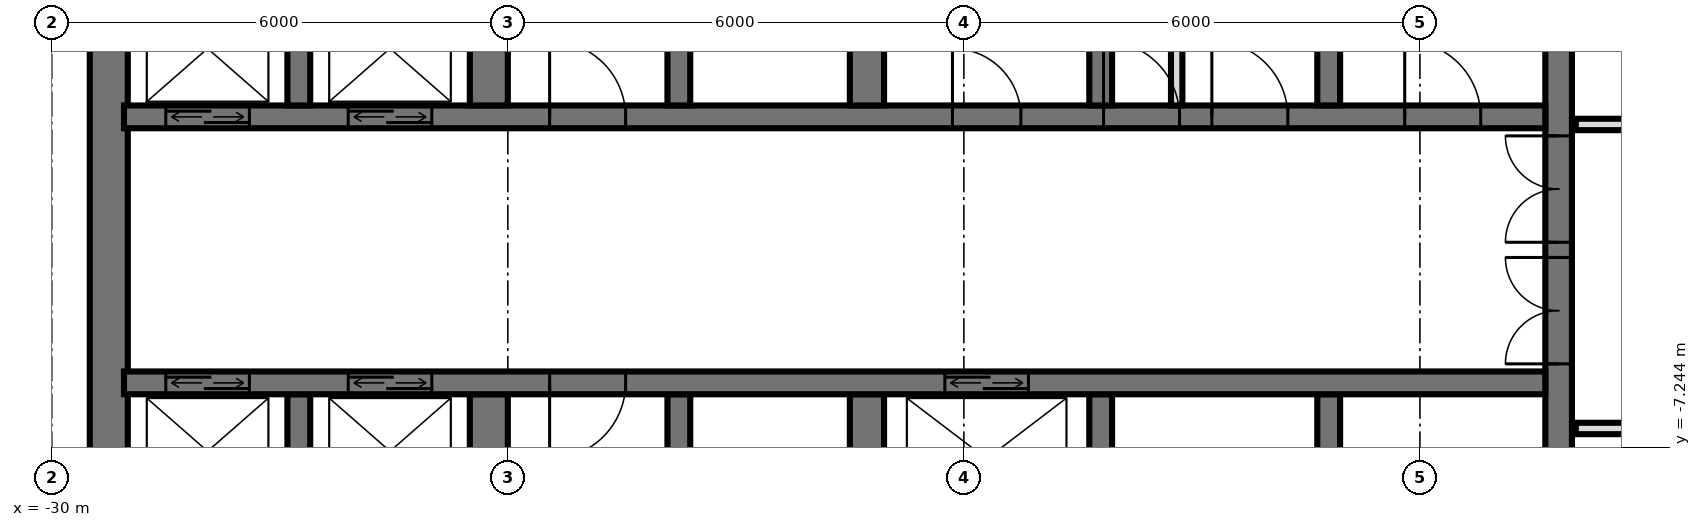
"""IFC4 building model, lengths in metres.
Left out: names, types, materials, properties, quantities, classifications, styles, units other than length and angle.
Written with IfcOpenShell. Run it as: python <this file> out.ifc"""

import sys

from ifc_helpers import new_model, si_unit, direction, frame, frame_2d, origin, place, context, subcontext, project, spatial, rectangle, extrude, element, fill, save


model = new_model("IFC4")
c1 = context("Model", 3, precision=1e-05, world=origin(), true_north=direction((0.0, 1.0)))
c2 = subcontext(c1, "Body", "Model", "MODEL_VIEW")
j1 = project(units=[si_unit("LENGTHUNIT", "METRE"), si_unit("PLANEANGLEUNIT", "RADIAN")], contexts=[c1])
p1 = place(None, origin())
s1 = spatial("IfcSite", under=j1, at=p1, CompositionType="ELEMENT")
p2 = place(p1, origin())
s2 = spatial("IfcBuilding", under=s1, at=p2, CompositionType="ELEMENT")
p3 = place(p2, frame((0.0, 0.0, 85.2)))
s3 = spatial("IfcBuildingStorey", under=s2, at=p3, CompositionType="ELEMENT", Elevation=85.2)
p4 = place(p3, frame((-10.175, -14.55, 0.0), z_axis=(0.0, 0.0, 1.0), x_axis=(0.0, 1.0, 0.0)))
e1 = element("IfcWall", 1, at=p4, inside=s3, PredefinedType="SHEAR", context=c2, shape_type="SweptSolid", body=[
    extrude(rectangle(XDim=14.1, YDim=0.35, at=frame_2d((7.05, 0.0))), origin(), (0.0, 0.0, 1.0), 3.6),
])
p5 = place(p4, frame((8.4, 0.0, 0.0)))
e2 = element("IfcOpeningElement", 2, at=p5, cuts=e1, PredefinedType="OPENING", context=c2, shape_type="SweptSolid", body=[
    extrude(rectangle(XDim=1.4, YDim=2.4, at=frame_2d((0.7, 1.2))), frame((0.0, 0.185, 0.0), z_axis=(0.0, -1.0, 0.0), x_axis=(1.0, 0.0, 0.0)), (0.0, 0.0, 1.0), 0.37),
])
p6 = place(p4, frame((10.0, 0.0, 0.0)))
e3 = element("IfcOpeningElement", 3, at=p6, cuts=e1, PredefinedType="OPENING", context=c2, shape_type="SweptSolid", body=[
    extrude(rectangle(XDim=1.4, YDim=2.4, at=frame_2d((0.7, 1.2))), frame((0.0, 0.185, 0.0), z_axis=(0.0, -1.0, 0.0), x_axis=(1.0, 0.0, 0.0)), (0.0, 0.0, 1.0), 0.37),
])
p7 = place(p4, frame((4.0, 0.0, 0.0)))
e4 = element("IfcOpeningElement", 4, at=p7, cuts=e1, PredefinedType="OPENING", context=c2, shape_type="SweptSolid", body=[
    extrude(rectangle(XDim=1.2, YDim=2.1, at=frame_2d((0.6, 1.05))), frame((0.0, 0.185, 0.0), z_axis=(0.0, -1.0, 0.0), x_axis=(1.0, 0.0, 0.0)), (0.0, 0.0, 1.0), 0.37),
])
p8 = place(p3, frame((-29.25, -14.55, 0.0), z_axis=(0.0, 0.0, 1.0), x_axis=(0.0, 1.0, 0.0)))
e5 = element("IfcWall", 5, at=p8, inside=s3, PredefinedType="SHEAR", context=c2, shape_type="SweptSolid", body=[
    extrude(rectangle(XDim=14.1, YDim=0.5, at=frame_2d((7.05, 0.0))), origin(), (0.0, 0.0, 1.0), 3.6),
])
p9 = place(p3, frame((-29.05, -2.9, 0.0), z_axis=(0.0, 0.0, 1.0), x_axis=(1.0, 0.0, 0.0)))
e6 = element("IfcWall", 6, at=p9, inside=s3, PredefinedType="SHEAR", context=c2, shape_type="SweptSolid", body=[
    extrude(rectangle(XDim=18.7, YDim=0.3, at=frame_2d((9.35, 0.0))), origin(), (0.0, 0.0, 1.0), 3.6),
])
p10 = place(p9, frame((2.95, 0.0, 0.0)))
e7 = element("IfcOpeningElement", 7, at=p10, cuts=e6, PredefinedType="OPENING", context=c2, shape_type="SweptSolid", body=[
    extrude(rectangle(XDim=1.1, YDim=2.1, at=frame_2d((0.55, 1.05))), frame((0.0, 0.16, 0.0), z_axis=(0.0, -1.0, 0.0), x_axis=(1.0, 0.0, 0.0)), (0.0, 0.0, 1.0), 0.32),
])
p11 = place(p9, frame((0.55, 0.0, 0.0)))
e8 = element("IfcOpeningElement", 8, at=p11, cuts=e6, PredefinedType="OPENING", context=c2, shape_type="SweptSolid", body=[
    extrude(rectangle(XDim=1.1, YDim=2.1, at=frame_2d((0.55, 1.05))), frame((0.0, 0.16, 0.0), z_axis=(0.0, -1.0, 0.0), x_axis=(1.0, 0.0, 0.0)), (0.0, 0.0, 1.0), 0.32),
])
p12 = place(p9, frame((10.9, 0.0, 0.0)))
e9 = element("IfcOpeningElement", 9, at=p12, cuts=e6, PredefinedType="OPENING", context=c2, shape_type="SweptSolid", body=[
    extrude(rectangle(XDim=0.9, YDim=2.1, at=frame_2d((0.45, 1.05))), frame((0.0, 0.16, 0.0), z_axis=(0.0, -1.0, 0.0), x_axis=(1.0, 0.0, 0.0)), (0.0, 0.0, 1.0), 0.32),
])
p13 = place(p9, frame((16.85, 0.0, 0.0)))
e10 = element("IfcOpeningElement", 10, at=p13, cuts=e6, PredefinedType="OPENING", context=c2, shape_type="SweptSolid", body=[
    extrude(rectangle(XDim=1.0, YDim=2.1, at=frame_2d((0.5, 1.05))), frame((0.0, 0.16, 0.0), z_axis=(0.0, -1.0, 0.0), x_axis=(1.0, 0.0, 0.0)), (0.0, 0.0, 1.0), 0.32),
])
p14 = place(p9, frame((14.312, 0.0, 0.0)))
e11 = element("IfcOpeningElement", 11, at=p14, cuts=e6, PredefinedType="OPENING", context=c2, shape_type="SweptSolid", body=[
    extrude(rectangle(XDim=1.0, YDim=2.1, at=frame_2d((0.5, 1.05))), frame((0.0, 0.16, 0.0), z_axis=(0.0, -1.0, 0.0), x_axis=(1.0, 0.0, 0.0)), (0.0, 0.0, 1.0), 0.32),
])
p15 = place(p9, frame((12.887, 0.0, 0.0)))
e12 = element("IfcOpeningElement", 12, at=p15, cuts=e6, PredefinedType="OPENING", context=c2, shape_type="SweptSolid", body=[
    extrude(rectangle(XDim=1.0, YDim=2.1, at=frame_2d((0.5, 1.05))), frame((0.0, 0.16, 0.0), z_axis=(0.0, -1.0, 0.0), x_axis=(1.0, 0.0, 0.0)), (0.0, 0.0, 1.0), 0.32),
])
p16 = place(p9, frame((5.6, 0.0, 0.0)))
e13 = element("IfcOpeningElement", 13, at=p16, cuts=e6, PredefinedType="OPENING", context=c2, shape_type="SweptSolid", body=[
    extrude(rectangle(XDim=1.0, YDim=2.1, at=frame_2d((0.5, 1.05))), frame((0.0, 0.16, 0.0), z_axis=(0.0, -1.0, 0.0), x_axis=(1.0, 0.0, 0.0)), (0.0, 0.0, 1.0), 0.32),
])
p17 = place(p3, frame((-29.05, -6.4, 0.0), z_axis=(0.0, 0.0, 1.0), x_axis=(1.0, 0.0, 0.0)))
e14 = element("IfcWall", 14, at=p17, inside=s3, PredefinedType="SHEAR", context=c2, shape_type="SweptSolid", body=[
    extrude(rectangle(XDim=18.7, YDim=0.3, at=frame_2d((9.35, 0.0))), origin(), (0.0, 0.0, 1.0), 3.6),
])
p18 = place(p17, frame((2.95, 0.0, 0.0)))
e15 = element("IfcOpeningElement", 15, at=p18, cuts=e14, PredefinedType="OPENING", context=c2, shape_type="SweptSolid", body=[
    extrude(rectangle(XDim=1.1, YDim=2.1, at=frame_2d((0.55, 1.05))), frame((0.0, 0.16, 0.0), z_axis=(0.0, -1.0, 0.0), x_axis=(1.0, 0.0, 0.0)), (0.0, 0.0, 1.0), 0.32),
])
p19 = place(p17, frame((0.55, 0.0, 0.0)))
e16 = element("IfcOpeningElement", 16, at=p19, cuts=e14, PredefinedType="OPENING", context=c2, shape_type="SweptSolid", body=[
    extrude(rectangle(XDim=1.1, YDim=2.1, at=frame_2d((0.55, 1.05))), frame((0.0, 0.16, 0.0), z_axis=(0.0, -1.0, 0.0), x_axis=(1.0, 0.0, 0.0)), (0.0, 0.0, 1.0), 0.32),
])
p20 = place(p17, frame((10.8, 0.0, 0.0)))
e17 = element("IfcOpeningElement", 17, at=p20, cuts=e14, PredefinedType="OPENING", context=c2, shape_type="SweptSolid", body=[
    extrude(rectangle(XDim=1.1, YDim=2.1, at=frame_2d((0.55, 1.05))), frame((0.0, 0.16, 0.0), z_axis=(0.0, -1.0, 0.0), x_axis=(1.0, 0.0, 0.0)), (0.0, 0.0, 1.0), 0.32),
])
p21 = place(p17, frame((5.6, 0.0, 0.0)))
e18 = element("IfcOpeningElement", 18, at=p21, cuts=e14, PredefinedType="OPENING", context=c2, shape_type="SweptSolid", body=[
    extrude(rectangle(XDim=1.0, YDim=2.1, at=frame_2d((0.5, 1.05))), frame((0.0, 0.16, 0.0), z_axis=(0.0, -1.0, 0.0), x_axis=(1.0, 0.0, 0.0)), (0.0, 0.0, 1.0), 0.32),
])
for number, where, z_axis, x_axis in (
    (19, (-13.2, -2.75, 0.0), (0.0, 0.0, 1.0), (0.0, 1.0, 0.0)),
    (20, (-13.2, -8.85, 0.0), (0.0, 0.0, 1.0), (0.0, 1.0, 0.0)),
    (21, (-16.2, -2.75, 0.0), (0.0, 0.0, 1.0), (0.0, 1.0, 0.0)),
    (22, (-16.2, -8.85, 0.0), (0.0, 0.0, 1.0), (0.0, 1.0, 0.0)),
):
    element("IfcWall", number, at=place(p3, frame(where, z_axis=z_axis, x_axis=x_axis)), inside=s3, PredefinedType="SHEAR", context=c2, shape_type="SweptSolid", body=[
        extrude(rectangle(XDim=2.3, YDim=0.3, at=frame_2d((1.15, 0.0))), origin(), (0.0, 0.0, 1.0), 3.6),
    ])
for number, where, z_axis, x_axis in (
    (23, (-19.275, -2.75, 0.0), (0.0, 0.0, 1.0), (0.0, 1.0, 0.0)),
    (24, (-19.275, -8.85, 0.0), (0.0, 0.0, 1.0), (0.0, 1.0, 0.0)),
):
    element("IfcWall", number, at=place(p3, frame(where, z_axis=z_axis, x_axis=x_axis)), inside=s3, PredefinedType="SHEAR", context=c2, shape_type="SweptSolid", body=[
        extrude(rectangle(XDim=2.3, YDim=0.45, at=frame_2d((1.15, 0.0))), origin(), (0.0, 0.0, 1.0), 3.6),
    ])
for number, where, z_axis, x_axis in (
    (25, (-21.75, -2.75, 0.0), (0.0, 0.0, 1.0), (0.0, 1.0, 0.0)),
    (26, (-21.75, -8.85, 0.0), (0.0, 0.0, 1.0), (0.0, 1.0, 0.0)),
):
    element("IfcWall", number, at=place(p3, frame(where, z_axis=z_axis, x_axis=x_axis)), inside=s3, PredefinedType="SHEAR", context=c2, shape_type="SweptSolid", body=[
        extrude(rectangle(XDim=2.3, YDim=0.3, at=frame_2d((1.15, 0.0))), origin(), (0.0, 0.0, 1.0), 3.6),
    ])
for number, where, z_axis, x_axis in (
    (27, (-24.25, -2.75, 0.0), (0.0, 0.0, 1.0), (0.0, 1.0, 0.0)),
    (28, (-24.25, -8.85, 0.0), (0.0, 0.0, 1.0), (0.0, 1.0, 0.0)),
):
    element("IfcWall", number, at=place(p3, frame(where, z_axis=z_axis, x_axis=x_axis)), inside=s3, PredefinedType="SHEAR", context=c2, shape_type="SweptSolid", body=[
        extrude(rectangle(XDim=2.3, YDim=0.5, at=frame_2d((1.15, 0.0))), origin(), (0.0, 0.0, 1.0), 3.6),
    ])
for number, where, z_axis, x_axis in (
    (29, (-26.75, -2.75, 0.0), (0.0, 0.0, 1.0), (0.0, 1.0, 0.0)),
    (30, (-26.75, -8.85, 0.0), (0.0, 0.0, 1.0), (0.0, 1.0, 0.0)),
):
    element("IfcWall", number, at=place(p3, frame(where, z_axis=z_axis, x_axis=x_axis)), inside=s3, PredefinedType="SHEAR", context=c2, shape_type="SweptSolid", body=[
        extrude(rectangle(XDim=2.3, YDim=0.3, at=frame_2d((1.15, 0.0))), origin(), (0.0, 0.0, 1.0), 3.6),
    ])
p22 = place(p3, frame((-15.2, -2.75, 0.0), z_axis=(0.0, 0.0, 1.0), x_axis=(0.0, 1.0, 0.0)))
e31 = element("IfcWall", 31, at=p22, inside=s3, PredefinedType="PARTITIONING", context=c2, shape_type="SweptSolid", body=[
    extrude(rectangle(XDim=2.3, YDim=0.15, at=frame_2d((1.15, 0.0))), origin(), (0.0, 0.0, 1.0), 3.3),
])
p23 = place(p3, frame((-9.95, -7.0, 0.0), z_axis=(0.0, 0.0, 1.0), x_axis=(1.0, 0.0, 0.0)))
e32 = element("IfcWall", 32, at=p23, inside=s3, PredefinedType="PARTITIONING", context=c2, shape_type="SweptSolid", body=[
    extrude(rectangle(XDim=19.9, YDim=0.15, at=frame_2d((9.95, 0.0))), origin(), (0.0, 0.0, 1.0), 3.32),
])
p24 = place(p23, frame((9.45, 0.0, 0.0)))
e33 = element("IfcOpeningElement", 33, at=p24, cuts=e32, PredefinedType="OPENING", context=c2, shape_type="SweptSolid", body=[
    extrude(rectangle(XDim=1.0, YDim=2.1, at=frame_2d((0.5, 1.05))), frame((0.0, 0.085, 0.0), z_axis=(0.0, -1.0, 0.0), x_axis=(1.0, 0.0, 0.0)), (0.0, 0.0, 1.0), 0.17),
])
p25 = place(p23, frame((15.45, 0.0, 0.0)))
e34 = element("IfcOpeningElement", 34, at=p25, cuts=e32, PredefinedType="OPENING", context=c2, shape_type="SweptSolid", body=[
    extrude(rectangle(XDim=1.0, YDim=2.1, at=frame_2d((0.5, 1.05))), frame((0.0, 0.085, 0.0), z_axis=(0.0, -1.0, 0.0), x_axis=(1.0, 0.0, 0.0)), (0.0, 0.0, 1.0), 0.17),
])
p26 = place(p3, frame((-9.95, -3.0, 0.0), z_axis=(0.0, 0.0, 1.0), x_axis=(1.0, 0.0, 0.0)))
e35 = element("IfcWall", 35, at=p26, inside=s3, PredefinedType="PARTITIONING", context=c2, shape_type="SweptSolid", body=[
    extrude(rectangle(XDim=19.9, YDim=0.15, at=frame_2d((9.95, 0.0))), origin(), (0.0, 0.0, 1.0), 3.32),
])
p27 = place(p26, frame((2.2, 0.0, 0.0)))
e36 = element("IfcOpeningElement", 36, at=p27, cuts=e35, PredefinedType="OPENING", context=c2, shape_type="SweptSolid", body=[
    extrude(rectangle(XDim=1.0, YDim=2.1, at=frame_2d((0.5, 1.05))), frame((0.0, 0.085, 0.0), z_axis=(0.0, -1.0, 0.0), x_axis=(1.0, 0.0, 0.0)), (0.0, 0.0, 1.0), 0.17),
])
p28 = place(p26, frame((7.2, 0.0, 0.0)))
e37 = element("IfcOpeningElement", 37, at=p28, cuts=e35, PredefinedType="OPENING", context=c2, shape_type="SweptSolid", body=[
    extrude(rectangle(XDim=1.0, YDim=2.1, at=frame_2d((0.5, 1.05))), frame((0.0, 0.085, 0.0), z_axis=(0.0, -1.0, 0.0), x_axis=(1.0, 0.0, 0.0)), (0.0, 0.0, 1.0), 0.17),
])
p29 = place(p26, frame((11.7, 0.0, 0.0)))
e38 = element("IfcOpeningElement", 38, at=p29, cuts=e35, PredefinedType="OPENING", context=c2, shape_type="SweptSolid", body=[
    extrude(rectangle(XDim=1.0, YDim=2.1, at=frame_2d((0.5, 1.05))), frame((0.0, 0.085, 0.0), z_axis=(0.0, -1.0, 0.0), x_axis=(1.0, 0.0, 0.0)), (0.0, 0.0, 1.0), 0.17),
])
p30 = place(p26, frame((15.45, 0.0, 0.0)))
e39 = element("IfcOpeningElement", 39, at=p30, cuts=e35, PredefinedType="OPENING", context=c2, shape_type="SweptSolid", body=[
    extrude(rectangle(XDim=1.0, YDim=2.1, at=frame_2d((0.5, 1.05))), frame((0.0, 0.085, 0.0), z_axis=(0.0, -1.0, 0.0), x_axis=(1.0, 0.0, 0.0)), (0.0, 0.0, 1.0), 0.17),
])
p31 = place(p26, frame((18.2, 0.0, 0.0)))
e40 = element("IfcOpeningElement", 40, at=p31, cuts=e35, PredefinedType="OPENING", context=c2, shape_type="SweptSolid", body=[
    extrude(rectangle(XDim=1.0, YDim=2.1, at=frame_2d((0.5, 1.05))), frame((0.0, 0.085, 0.0), z_axis=(0.0, -1.0, 0.0), x_axis=(1.0, 0.0, 0.0)), (0.0, 0.0, 1.0), 0.17),
])
p32 = place(p10, origin())
e41 = element("IfcDoor", 41, at=p32, inside=s3, OperationType="DOUBLE_DOOR_SLIDING", PredefinedType="USERDEFINED", context=c2, shape_type="SweptSolid", body=[
    extrude(rectangle(XDim=1.1, YDim=2.1, at=frame_2d((0.55, 1.05))), frame((0.0, 0.025, 0.0), z_axis=(0.0, -1.0, 0.0), x_axis=(1.0, 0.0, 0.0)), (0.0, 0.0, 1.0), 0.05),
])
fill(e7, e41)
p33 = place(p11, origin())
e42 = element("IfcDoor", 42, at=p33, inside=s3, OperationType="DOUBLE_DOOR_SLIDING", PredefinedType="USERDEFINED", context=c2, shape_type="SweptSolid", body=[
    extrude(rectangle(XDim=1.1, YDim=2.1, at=frame_2d((0.55, 1.05))), frame((0.0, 0.025, 0.0), z_axis=(0.0, -1.0, 0.0), x_axis=(1.0, 0.0, 0.0)), (0.0, 0.0, 1.0), 0.05),
])
fill(e8, e42)
p34 = place(p18, origin())
e43 = element("IfcDoor", 43, at=p34, inside=s3, OperationType="DOUBLE_DOOR_SLIDING", PredefinedType="USERDEFINED", context=c2, shape_type="SweptSolid", body=[
    extrude(rectangle(XDim=1.1, YDim=2.1, at=frame_2d((0.55, 1.05))), frame((0.0, 0.025, 0.0), z_axis=(0.0, -1.0, 0.0), x_axis=(1.0, 0.0, 0.0)), (0.0, 0.0, 1.0), 0.05),
])
fill(e15, e43)
p35 = place(p19, origin())
e44 = element("IfcDoor", 44, at=p35, inside=s3, OperationType="DOUBLE_DOOR_SLIDING", PredefinedType="USERDEFINED", context=c2, shape_type="SweptSolid", body=[
    extrude(rectangle(XDim=1.1, YDim=2.1, at=frame_2d((0.55, 1.05))), frame((0.0, 0.025, 0.0), z_axis=(0.0, -1.0, 0.0), x_axis=(1.0, 0.0, 0.0)), (0.0, 0.0, 1.0), 0.05),
])
fill(e16, e44)
p36 = place(p20, origin())
e45 = element("IfcDoor", 45, at=p36, inside=s3, OperationType="DOUBLE_DOOR_SLIDING", PredefinedType="USERDEFINED", context=c2, shape_type="SweptSolid", body=[
    extrude(rectangle(XDim=1.1, YDim=2.1, at=frame_2d((0.55, 1.05))), frame((0.0, 0.025, 0.0), z_axis=(0.0, -1.0, 0.0), x_axis=(1.0, 0.0, 0.0)), (0.0, 0.0, 1.0), 0.05),
])
fill(e17, e45)
p37 = place(p5, origin())
e46 = element("IfcDoor", 46, at=p37, inside=s3, OperationType="DOUBLE_DOOR_SINGLE_SWING", PredefinedType="DOOR", context=c2, shape_type="SweptSolid", body=[
    extrude(rectangle(XDim=1.4, YDim=2.4, at=frame_2d((0.7, 1.2))), frame((0.0, 0.025, 0.0), z_axis=(0.0, -1.0, 0.0), x_axis=(1.0, 0.0, 0.0)), (0.0, 0.0, 1.0), 0.05),
])
fill(e2, e46)
p38 = place(p6, origin())
e47 = element("IfcDoor", 47, at=p38, inside=s3, OperationType="DOUBLE_DOOR_SINGLE_SWING", PredefinedType="DOOR", context=c2, shape_type="SweptSolid", body=[
    extrude(rectangle(XDim=1.4, YDim=2.4, at=frame_2d((0.7, 1.2))), frame((0.0, 0.025, 0.0), z_axis=(0.0, -1.0, 0.0), x_axis=(1.0, 0.0, 0.0)), (0.0, 0.0, 1.0), 0.05),
])
fill(e3, e47)
p39 = place(p12, origin())
e48 = element("IfcDoor", 48, at=p39, inside=s3, OperationType="SINGLE_SWING_RIGHT", PredefinedType="DOOR", context=c2, shape_type="SweptSolid", body=[
    extrude(rectangle(XDim=0.9, YDim=2.1, at=frame_2d((0.45, 1.05))), frame((0.0, 0.025, 0.0), z_axis=(0.0, -1.0, 0.0), x_axis=(1.0, 0.0, 0.0)), (0.0, 0.0, 1.0), 0.05),
])
fill(e9, e48)
p40 = place(p13, origin())
e49 = element("IfcDoor", 49, at=p40, inside=s3, OperationType="SINGLE_SWING_RIGHT", PredefinedType="DOOR", context=c2, shape_type="SweptSolid", body=[
    extrude(rectangle(XDim=1.0, YDim=2.1, at=frame_2d((0.5, 1.05))), frame((0.0, 0.025, 0.0), z_axis=(0.0, -1.0, 0.0), x_axis=(1.0, 0.0, 0.0)), (0.0, 0.0, 1.0), 0.05),
])
fill(e10, e49)
p41 = place(p14, origin())
e50 = element("IfcDoor", 50, at=p41, inside=s3, OperationType="SINGLE_SWING_RIGHT", PredefinedType="DOOR", context=c2, shape_type="SweptSolid", body=[
    extrude(rectangle(XDim=1.0, YDim=2.1, at=frame_2d((0.5, 1.05))), frame((0.0, 0.025, 0.0), z_axis=(0.0, -1.0, 0.0), x_axis=(1.0, 0.0, 0.0)), (0.0, 0.0, 1.0), 0.05),
])
fill(e11, e50)
p42 = place(p15, origin())
e51 = element("IfcDoor", 51, at=p42, inside=s3, OperationType="SINGLE_SWING_RIGHT", PredefinedType="DOOR", context=c2, shape_type="SweptSolid", body=[
    extrude(rectangle(XDim=1.0, YDim=2.1, at=frame_2d((0.5, 1.05))), frame((0.0, 0.025, 0.0), z_axis=(0.0, -1.0, 0.0), x_axis=(1.0, 0.0, 0.0)), (0.0, 0.0, 1.0), 0.05),
])
fill(e12, e51)
p43 = place(p16, origin())
e52 = element("IfcDoor", 52, at=p43, inside=s3, OperationType="SINGLE_SWING_RIGHT", PredefinedType="DOOR", context=c2, shape_type="SweptSolid", body=[
    extrude(rectangle(XDim=1.0, YDim=2.1, at=frame_2d((0.5, 1.05))), frame((0.0, 0.025, 0.0), z_axis=(0.0, -1.0, 0.0), x_axis=(1.0, 0.0, 0.0)), (0.0, 0.0, 1.0), 0.05),
])
fill(e13, e52)
p44 = place(p21, frame((0.5, 0.0, 0.0), z_axis=(0.0, 0.0, 1.0), x_axis=(-1.0, 0.0, 0.0)))
e53 = element("IfcDoor", 53, at=p44, inside=s3, OperationType="SINGLE_SWING_LEFT", PredefinedType="DOOR", context=c2, shape_type="SweptSolid", body=[
    extrude(rectangle(XDim=1.0, YDim=2.1, at=frame_2d((0.0, 1.05))), frame((0.0, -0.025, 0.0), z_axis=(0.0, 1.0, 0.0), x_axis=(-1.0, 0.0, 0.0)), (0.0, 0.0, 1.0), 0.05),
])
fill(e18, e53)
save(model, sys.argv[1])
